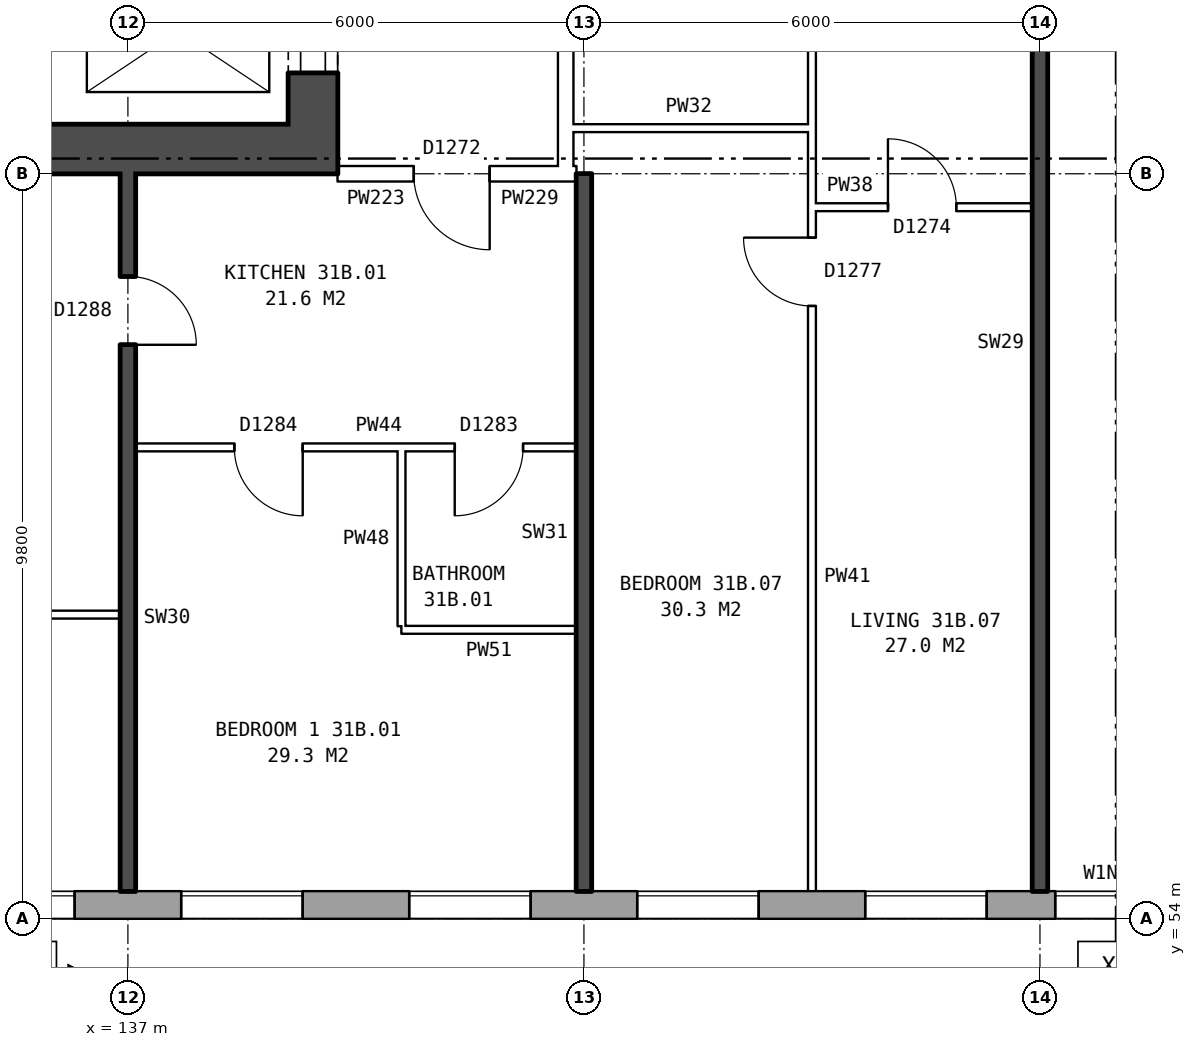
"""IFC4 building model, lengths in metres.
Left out: names, types, materials, properties, quantities, classifications, styles, units other than length and angle.
Written with IfcOpenShell. Run it as: python <this file> out.ifc"""

import sys

from ifc_helpers import new_model, si_unit, direction, frame, frame_2d, origin, place, context, subcontext, project, spatial, rectangle, extrude, element, fill, save


model = new_model("IFC4")
c1 = context("Model", 3, precision=1e-05, world=origin(), true_north=direction((0.0, 1.0)))
c2 = subcontext(c1, "Body", "Model", "MODEL_VIEW")
j1 = project(units=[si_unit("LENGTHUNIT", "METRE"), si_unit("PLANEANGLEUNIT", "RADIAN")], contexts=[c1])
p1 = place(None, origin())
s1 = spatial("IfcSite", under=j1, at=p1, CompositionType="ELEMENT")
p2 = place(p1, origin())
s2 = spatial("IfcBuilding", under=s1, at=p2, CompositionType="ELEMENT")
p3 = place(p2, frame((0.0, 0.0, 111.9)))
s3 = spatial("IfcBuildingStorey", under=s2, at=p3, CompositionType="ELEMENT", Elevation=111.9)
p4 = place(p3, frame((134.075, 54.18, 0.0), z_axis=(0.0, 0.0, 1.0), x_axis=(1.0, 0.0, 0.0)))
e1 = element("IfcWall", 1, at=p4, inside=s3, PredefinedType="STANDARD", context=c2, shape_type="SweptSolid", body=[
    extrude(rectangle(XDim=36.851, YDim=0.36, at=frame_2d((18.425, 0.0))), origin(), (0.0, 0.0, 1.0), 2.85),
])
p5 = place(p4, frame((0.625, 0.0, 0.8)))
e2 = element("IfcOpeningElement", 2, at=p5, cuts=e1, PredefinedType="OPENING", context=c2, shape_type="SweptSolid", body=[
    extrude(rectangle(XDim=1.6, YDim=1.8, at=frame_2d((0.8, 0.9))), frame((0.0, 0.19, 0.0), z_axis=(0.0, -1.0, 0.0), x_axis=(1.0, 0.0, 0.0)), (0.0, 0.0, 1.0), 0.38),
])
p6 = place(p4, frame((3.625, 0.0, 0.8)))
e3 = element("IfcOpeningElement", 3, at=p6, cuts=e1, PredefinedType="OPENING", context=c2, shape_type="SweptSolid", body=[
    extrude(rectangle(XDim=1.6, YDim=1.8, at=frame_2d((0.8, 0.9))), frame((0.0, 0.19, 0.0), z_axis=(0.0, -1.0, 0.0), x_axis=(1.0, 0.0, 0.0)), (0.0, 0.0, 1.0), 0.38),
])
p7 = place(p4, frame((6.625, 0.0, 0.8)))
e4 = element("IfcOpeningElement", 4, at=p7, cuts=e1, PredefinedType="OPENING", context=c2, shape_type="SweptSolid", body=[
    extrude(rectangle(XDim=1.6, YDim=1.8, at=frame_2d((0.8, 0.9))), frame((0.0, 0.19, 0.0), z_axis=(0.0, -1.0, 0.0), x_axis=(1.0, 0.0, 0.0)), (0.0, 0.0, 1.0), 0.38),
])
p8 = place(p4, frame((9.625, 0.0, 0.8)))
e5 = element("IfcOpeningElement", 5, at=p8, cuts=e1, PredefinedType="OPENING", context=c2, shape_type="SweptSolid", body=[
    extrude(rectangle(XDim=1.6, YDim=1.8, at=frame_2d((0.8, 0.9))), frame((0.0, 0.19, 0.0), z_axis=(0.0, -1.0, 0.0), x_axis=(1.0, 0.0, 0.0)), (0.0, 0.0, 1.0), 0.38),
])
p9 = place(p4, frame((12.625, 0.0, 0.8)))
e6 = element("IfcOpeningElement", 6, at=p9, cuts=e1, PredefinedType="OPENING", context=c2, shape_type="SweptSolid", body=[
    extrude(rectangle(XDim=1.6, YDim=1.8, at=frame_2d((0.8, 0.9))), frame((0.0, 0.19, 0.0), z_axis=(0.0, -1.0, 0.0), x_axis=(1.0, 0.0, 0.0)), (0.0, 0.0, 1.0), 0.38),
])
p10 = place(p4, frame((15.125, 0.0, 1.35)))
e7 = element("IfcOpeningElement", 7, at=p10, cuts=e1, PredefinedType="OPENING", context=c2, shape_type="SweptSolid", body=[
    extrude(rectangle(XDim=1.2, YDim=1.2, at=frame_2d((0.6, 0.6))), frame((0.0, 0.19, 0.0), z_axis=(0.0, -1.0, 0.0), x_axis=(1.0, 0.0, 0.0)), (0.0, 0.0, 1.0), 0.38),
])
p11 = place(p4, frame((18.075, 0.0, 0.25)))
e8 = element("IfcOpeningElement", 8, at=p11, cuts=e1, PredefinedType="OPENING", context=c2, shape_type="SweptSolid", body=[
    extrude(rectangle(XDim=0.8, YDim=1.5, at=frame_2d((0.4, 0.75))), frame((0.0, 0.19, 0.0), z_axis=(0.0, -1.0, 0.0), x_axis=(1.0, 0.0, 0.0)), (0.0, 0.0, 1.0), 0.38),
])
p12 = place(p4, frame((21.625, 0.0, 0.8)))
e9 = element("IfcOpeningElement", 9, at=p12, cuts=e1, PredefinedType="OPENING", context=c2, shape_type="SweptSolid", body=[
    extrude(rectangle(XDim=1.6, YDim=1.8, at=frame_2d((0.8, 0.9))), frame((0.0, 0.19, 0.0), z_axis=(0.0, -1.0, 0.0), x_axis=(1.0, 0.0, 0.0)), (0.0, 0.0, 1.0), 0.38),
])
p13 = place(p4, frame((24.625, 0.0, 0.8)))
e10 = element("IfcOpeningElement", 10, at=p13, cuts=e1, PredefinedType="OPENING", context=c2, shape_type="SweptSolid", body=[
    extrude(rectangle(XDim=1.6, YDim=1.8, at=frame_2d((0.8, 0.9))), frame((0.0, 0.19, 0.0), z_axis=(0.0, -1.0, 0.0), x_axis=(1.0, 0.0, 0.0)), (0.0, 0.0, 1.0), 0.38),
])
p14 = place(p4, frame((27.625, 0.0, 0.8)))
e11 = element("IfcOpeningElement", 11, at=p14, cuts=e1, PredefinedType="OPENING", context=c2, shape_type="SweptSolid", body=[
    extrude(rectangle(XDim=1.6, YDim=1.8, at=frame_2d((0.8, 0.9))), frame((0.0, 0.19, 0.0), z_axis=(0.0, -1.0, 0.0), x_axis=(1.0, 0.0, 0.0)), (0.0, 0.0, 1.0), 0.38),
])
p15 = place(p4, frame((30.625, 0.0, 0.8)))
e12 = element("IfcOpeningElement", 12, at=p15, cuts=e1, PredefinedType="OPENING", context=c2, shape_type="SweptSolid", body=[
    extrude(rectangle(XDim=1.6, YDim=1.8, at=frame_2d((0.8, 0.9))), frame((0.0, 0.19, 0.0), z_axis=(0.0, -1.0, 0.0), x_axis=(1.0, 0.0, 0.0)), (0.0, 0.0, 1.0), 0.38),
])
p16 = place(p4, frame((33.625, 0.0, 0.8)))
e13 = element("IfcOpeningElement", 13, at=p16, cuts=e1, PredefinedType="OPENING", context=c2, shape_type="SweptSolid", body=[
    extrude(rectangle(XDim=1.6, YDim=1.8, at=frame_2d((0.8, 0.9))), frame((0.0, 0.19, 0.0), z_axis=(0.0, -1.0, 0.0), x_axis=(1.0, 0.0, 0.0)), (0.0, 0.0, 1.0), 0.38),
])
p17 = place(p4, frame((17.075, 0.0, 0.15)))
e14 = element("IfcOpeningElement", 14, at=p17, cuts=e1, PredefinedType="OPENING", context=c2, shape_type="SweptSolid", body=[
    extrude(rectangle(XDim=0.6, YDim=0.9, at=frame_2d((0.3, 0.45))), frame((0.0, 0.19, 0.0), z_axis=(0.0, -1.0, 0.0), x_axis=(1.0, 0.0, 0.0)), (0.0, 0.0, 1.0), 0.38),
])
p18 = place(p4, frame((19.175, 0.0, 0.15)))
e15 = element("IfcOpeningElement", 15, at=p18, cuts=e1, PredefinedType="OPENING", context=c2, shape_type="SweptSolid", body=[
    extrude(rectangle(XDim=0.6, YDim=0.9, at=frame_2d((0.3, 0.45))), frame((0.0, 0.19, 0.0), z_axis=(0.0, -1.0, 0.0), x_axis=(1.0, 0.0, 0.0)), (0.0, 0.0, 1.0), 0.38),
])
p19 = place(p3, frame((139.435, 64.45, 0.0), z_axis=(0.0, 0.0, 1.0), x_axis=(0.0, 1.0, 0.0)))
e16 = element("IfcWall", 16, at=p19, inside=s3, PredefinedType="SHEAR", context=c2, shape_type="SweptSolid", body=[
    extrude(rectangle(XDim=11.1, YDim=0.65, at=frame_2d((5.55, 0.0))), origin(), (0.0, 0.0, 1.0), 2.85),
])
p20 = place(p19, frame((0.675, 0.0, 0.0)))
e17 = element("IfcOpeningElement", 17, at=p20, cuts=e16, PredefinedType="OPENING", context=c2, shape_type="SweptSolid", body=[
    extrude(rectangle(XDim=1.1, YDim=2.1, at=frame_2d((0.55, 1.05))), frame((0.0, 0.335, 0.0), z_axis=(0.0, -1.0, 0.0), x_axis=(1.0, 0.0, 0.0)), (0.0, 0.0, 1.0), 0.67),
])
p21 = place(p19, frame((9.25, 0.0, 0.0)))
e18 = element("IfcOpeningElement", 18, at=p21, cuts=e16, PredefinedType="OPENING", context=c2, shape_type="SweptSolid", body=[
    extrude(rectangle(XDim=1.1, YDim=2.1, at=frame_2d((0.55, 1.05))), frame((0.0, 0.335, 0.0), z_axis=(0.0, -1.0, 0.0), x_axis=(1.0, 0.0, 0.0)), (0.0, 0.0, 1.0), 0.67),
])
p22 = place(p19, frame((7.475, 0.0, 0.0)))
e19 = element("IfcOpeningElement", 19, at=p22, cuts=e16, PredefinedType="OPENING", context=c2, shape_type="SweptSolid", body=[
    extrude(rectangle(XDim=0.85, YDim=2.1, at=frame_2d((0.425, 1.05))), frame((0.0, 0.335, 0.0), z_axis=(0.0, -1.0, 0.0), x_axis=(1.0, 0.0, 0.0)), (0.0, 0.0, 1.0), 0.67),
])
p23 = place(p3, frame((139.76, 64.125, 0.0), z_axis=(0.0, 0.0, 1.0), x_axis=(-1.0, 0.0, 0.0)))
e20 = element("IfcWall", 20, at=p23, inside=s3, PredefinedType="SHEAR", context=c2, shape_type="SweptSolid", body=[
    extrude(rectangle(XDim=8.4, YDim=0.65, at=frame_2d((4.2, 0.0))), origin(), (0.0, 0.0, 1.0), 2.85),
])
p24 = place(p3, frame((142.76, 63.9, 0.0), z_axis=(0.0, 0.0, 1.0), x_axis=(0.0, 1.0, 0.0)))
e21 = element("IfcWall", 21, at=p24, inside=s3, PredefinedType="PARTITIONING", context=c2, shape_type="SweptSolid", body=[
    extrude(rectangle(XDim=12.2, YDim=0.2, at=frame_2d((6.1, 0.0))), origin(), (0.0, 0.0, 1.0), 2.85),
])
p25 = place(p24, frame((5.1, 0.0, 0.0)))
e22 = element("IfcOpeningElement", 22, at=p25, cuts=e21, PredefinedType="OPENING", context=c2, shape_type="SweptSolid", body=[
    extrude(rectangle(XDim=2.0, YDim=2.1, at=frame_2d((1.0, 1.05))), frame((0.0, 0.11, 0.0), z_axis=(0.0, -1.0, 0.0), x_axis=(1.0, 0.0, 0.0)), (0.0, 0.0, 1.0), 0.22),
])
p26 = place(p3, frame((140.6, 57.8, 0.0), z_axis=(0.0, 0.0, 1.0), x_axis=(1.0, 0.0, 0.0)))
e23 = element("IfcWall", 23, at=p26, inside=s3, PredefinedType="PARTITIONING", context=c2, shape_type="SweptSolid", body=[
    extrude(rectangle(XDim=2.3, YDim=0.1, at=frame_2d((1.15, 0.0))), origin(), (0.0, 0.0, 1.0), 2.85),
])
p27 = place(p3, frame((131.36, 58.0, 0.0), z_axis=(0.0, 0.0, 1.0), x_axis=(1.0, 0.0, 0.0)))
e24 = element("IfcWall", 24, at=p27, inside=s3, PredefinedType="PARTITIONING", context=c2, shape_type="SweptSolid", body=[
    extrude(rectangle(XDim=5.54, YDim=0.1, at=frame_2d((2.77, 0.0))), origin(), (0.0, 0.0, 1.0), 2.85),
])
p28 = place(p27, frame((2.32, 0.0, 0.0)))
e25 = element("IfcOpeningElement", 25, at=p28, cuts=e24, PredefinedType="OPENING", context=c2, shape_type="SweptSolid", body=[
    extrude(rectangle(XDim=0.9, YDim=2.1, at=frame_2d((0.45, 1.05))), frame((0.0, 0.06, 0.0), z_axis=(0.0, -1.0, 0.0), x_axis=(1.0, 0.0, 0.0)), (0.0, 0.0, 1.0), 0.12),
])
p29 = place(p3, frame((137.1, 60.2, 0.0), z_axis=(0.0, 0.0, 1.0), x_axis=(1.0, 0.0, 0.0)))
e26 = element("IfcWall", 26, at=p29, inside=s3, PredefinedType="PARTITIONING", context=c2, shape_type="SweptSolid", body=[
    extrude(rectangle(XDim=5.8, YDim=0.1, at=frame_2d((2.9, 0.0))), origin(), (0.0, 0.0, 1.0), 2.85),
])
p30 = place(p29, frame((1.3, 0.0, 0.0)))
e27 = element("IfcOpeningElement", 27, at=p30, cuts=e26, PredefinedType="OPENING", context=c2, shape_type="SweptSolid", body=[
    extrude(rectangle(XDim=0.9, YDim=2.1, at=frame_2d((0.45, 1.05))), frame((0.0, 0.06, 0.0), z_axis=(0.0, -1.0, 0.0), x_axis=(1.0, 0.0, 0.0)), (0.0, 0.0, 1.0), 0.12),
])
p31 = place(p29, frame((4.2, 0.0, 0.0)))
e28 = element("IfcOpeningElement", 28, at=p31, cuts=e26, PredefinedType="OPENING", context=c2, shape_type="SweptSolid", body=[
    extrude(rectangle(XDim=0.9, YDim=2.1, at=frame_2d((0.45, 1.05))), frame((0.0, 0.06, 0.0), z_axis=(0.0, -1.0, 0.0), x_axis=(1.0, 0.0, 0.0)), (0.0, 0.0, 1.0), 0.12),
])
p32 = place(p3, frame((146.0, 63.36, 0.0), z_axis=(0.0, 0.0, 1.0), x_axis=(1.0, 0.0, 0.0)))
e29 = element("IfcWall", 29, at=p32, inside=s3, PredefinedType="PARTITIONING", context=c2, shape_type="SweptSolid", body=[
    extrude(rectangle(XDim=2.9, YDim=0.1, at=frame_2d((1.45, 0.0))), origin(), (0.0, 0.0, 1.0), 2.85),
])
p33 = place(p32, frame((1.0, 0.0, 0.0)))
e30 = element("IfcOpeningElement", 30, at=p33, cuts=e29, PredefinedType="OPENING", context=c2, shape_type="SweptSolid", body=[
    extrude(rectangle(XDim=0.9, YDim=2.1, at=frame_2d((0.45, 1.05))), frame((0.0, 0.06, 0.0), z_axis=(0.0, -1.0, 0.0), x_axis=(1.0, 0.0, 0.0)), (0.0, 0.0, 1.0), 0.12),
])
p34 = place(p3, frame((139.76, 63.8, 0.0), z_axis=(0.0, 0.0, 1.0), x_axis=(1.0, 0.0, 0.0)))
e31 = element("IfcWall", 31, at=p34, inside=s3, PredefinedType="PARTITIONING", context=c2, shape_type="SweptSolid", body=[
    extrude(rectangle(XDim=3.0, YDim=0.2, at=frame_2d((1.5, 0.0))), origin(), (0.0, 0.0, 1.0), 2.85),
])
p35 = place(p34, frame((1.0, 0.0, 0.0)))
e32 = element("IfcOpeningElement", 32, at=p35, cuts=e31, PredefinedType="OPENING", context=c2, shape_type="SweptSolid", body=[
    extrude(rectangle(XDim=1.0, YDim=2.1, at=frame_2d((0.5, 1.05))), frame((0.0, 0.11, 0.0), z_axis=(0.0, -1.0, 0.0), x_axis=(1.0, 0.0, 0.0)), (0.0, 0.0, 1.0), 0.22),
])
p36 = place(p3, frame((142.76, 63.8, 0.0), z_axis=(0.0, 0.0, 1.0), x_axis=(1.0, 0.0, 0.0)))
e33 = element("IfcWall", 33, at=p36, inside=s3, PredefinedType="PARTITIONING", context=c2, shape_type="SweptSolid", body=[
    extrude(rectangle(XDim=0.14, YDim=0.2, at=frame_2d((0.07, 0.0))), origin(), (0.0, 0.0, 1.0), 2.85),
])
p37 = place(p3, frame((142.76, 64.4, 0.0), z_axis=(0.0, 0.0, 1.0), x_axis=(1.0, 0.0, 0.0)))
e34 = element("IfcWall", 34, at=p37, inside=s3, PredefinedType="PARTITIONING", context=c2, shape_type="SweptSolid", body=[
    extrude(rectangle(XDim=3.24, YDim=0.1, at=frame_2d((1.62, 0.0))), origin(), (0.0, 0.0, 1.0), 2.85),
])
p38 = place(p3, frame((137.0, 54.36, 0.0), z_axis=(0.0, 0.0, 1.0), x_axis=(0.0, 1.0, 0.0)))
e35 = element("IfcWall", 35, at=p38, inside=s3, PredefinedType="SOLIDWALL", context=c2, shape_type="SweptSolid", body=[
    extrude(rectangle(XDim=9.44, YDim=0.2, at=frame_2d((4.72, 0.0))), origin(), (0.0, 0.0, 1.0), 2.85),
])
p39 = place(p38, frame((7.19, 0.0, 0.0)))
e36 = element("IfcOpeningElement", 36, at=p39, cuts=e35, PredefinedType="OPENING", context=c2, shape_type="SweptSolid", body=[
    extrude(rectangle(XDim=0.9, YDim=2.1, at=frame_2d((0.45, 1.05))), frame((0.0, 0.11, 0.0), z_axis=(0.0, -1.0, 0.0), x_axis=(1.0, 0.0, 0.0)), (0.0, 0.0, 1.0), 0.22),
])
p40 = place(p3, frame((140.6, 57.85, 0.0), z_axis=(0.0, 0.0, 1.0), x_axis=(0.0, 1.0, 0.0)))
e37 = element("IfcWall", 37, at=p40, inside=s3, PredefinedType="PARTITIONING", context=c2, shape_type="SweptSolid", body=[
    extrude(rectangle(XDim=2.3, YDim=0.1, at=frame_2d((1.15, 0.0))), origin(), (0.0, 0.0, 1.0), 2.85),
])
p41 = place(p3, frame((143.0, 54.36, 0.0), z_axis=(0.0, 0.0, 1.0), x_axis=(0.0, 1.0, 0.0)))
e38 = element("IfcWall", 38, at=p41, inside=s3, PredefinedType="SOLIDWALL", context=c2, shape_type="SweptSolid", body=[
    extrude(rectangle(XDim=9.44, YDim=0.2, at=frame_2d((4.72, 0.0))), origin(), (0.0, 0.0, 1.0), 2.85),
])
p42 = place(p3, frame((146.0, 54.36, 0.0), z_axis=(0.0, 0.0, 1.0), x_axis=(0.0, 1.0, 0.0)))
e39 = element("IfcWall", 39, at=p42, inside=s3, PredefinedType="PARTITIONING", context=c2, shape_type="SweptSolid", body=[
    extrude(rectangle(XDim=14.34, YDim=0.1, at=frame_2d((7.17, 0.0))), origin(), (0.0, 0.0, 1.0), 2.85),
])
p43 = place(p42, frame((7.7, 0.0, 0.0)))
e40 = element("IfcOpeningElement", 40, at=p43, cuts=e39, PredefinedType="OPENING", context=c2, shape_type="SweptSolid", body=[
    extrude(rectangle(XDim=0.9, YDim=2.1, at=frame_2d((0.45, 1.05))), frame((0.0, 0.06, 0.0), z_axis=(0.0, -1.0, 0.0), x_axis=(1.0, 0.0, 0.0)), (0.0, 0.0, 1.0), 0.12),
])
p44 = place(p42, frame((13.04, 0.0, 0.0)))
e41 = element("IfcOpeningElement", 41, at=p44, cuts=e39, PredefinedType="OPENING", context=c2, shape_type="SweptSolid", body=[
    extrude(rectangle(XDim=0.9, YDim=2.1, at=frame_2d((0.45, 1.05))), frame((0.0, 0.06, 0.0), z_axis=(0.0, -1.0, 0.0), x_axis=(1.0, 0.0, 0.0)), (0.0, 0.0, 1.0), 0.12),
])
p45 = place(p3, frame((149.0, 54.36, 0.0), z_axis=(0.0, 0.0, 1.0), x_axis=(0.0, 1.0, 0.0)))
e42 = element("IfcWall", 42, at=p45, inside=s3, PredefinedType="SOLIDWALL", context=c2, shape_type="SweptSolid", body=[
    extrude(rectangle(XDim=14.44, YDim=0.2, at=frame_2d((7.22, 0.0))), origin(), (0.0, 0.0, 1.0), 2.85),
])
p46 = place(p5, origin())
e43 = element("IfcWindow", 43, at=p46, inside=s3, PartitioningType="SINGLE_PANEL", PredefinedType="WINDOW", context=c2, shape_type="SweptSolid", body=[
    extrude(rectangle(XDim=1.6, YDim=1.8, at=frame_2d((0.8, 0.9))), frame((0.0, 0.15, 0.0), z_axis=(0.0, -1.0, 0.0), x_axis=(1.0, 0.0, 0.0)), (0.0, 0.0, 1.0), 0.06),
])
fill(e2, e43)
p47 = place(p6, origin())
e44 = element("IfcWindow", 44, at=p47, inside=s3, PartitioningType="SINGLE_PANEL", PredefinedType="WINDOW", context=c2, shape_type="SweptSolid", body=[
    extrude(rectangle(XDim=1.6, YDim=1.8, at=frame_2d((0.8, 0.9))), frame((0.0, 0.15, 0.0), z_axis=(0.0, -1.0, 0.0), x_axis=(1.0, 0.0, 0.0)), (0.0, 0.0, 1.0), 0.06),
])
fill(e3, e44)
p48 = place(p7, origin())
e45 = element("IfcWindow", 45, at=p48, inside=s3, PartitioningType="SINGLE_PANEL", PredefinedType="WINDOW", context=c2, shape_type="SweptSolid", body=[
    extrude(rectangle(XDim=1.6, YDim=1.8, at=frame_2d((0.8, 0.9))), frame((0.0, 0.15, 0.0), z_axis=(0.0, -1.0, 0.0), x_axis=(1.0, 0.0, 0.0)), (0.0, 0.0, 1.0), 0.06),
])
fill(e4, e45)
p49 = place(p8, origin())
e46 = element("IfcWindow", 46, at=p49, inside=s3, PartitioningType="SINGLE_PANEL", PredefinedType="WINDOW", context=c2, shape_type="SweptSolid", body=[
    extrude(rectangle(XDim=1.6, YDim=1.8, at=frame_2d((0.8, 0.9))), frame((0.0, 0.15, 0.0), z_axis=(0.0, -1.0, 0.0), x_axis=(1.0, 0.0, 0.0)), (0.0, 0.0, 1.0), 0.06),
])
fill(e5, e46)
p50 = place(p9, origin())
e47 = element("IfcWindow", 47, at=p50, inside=s3, PartitioningType="SINGLE_PANEL", PredefinedType="WINDOW", context=c2, shape_type="SweptSolid", body=[
    extrude(rectangle(XDim=1.6, YDim=1.8, at=frame_2d((0.8, 0.9))), frame((0.0, 0.15, 0.0), z_axis=(0.0, -1.0, 0.0), x_axis=(1.0, 0.0, 0.0)), (0.0, 0.0, 1.0), 0.06),
])
fill(e6, e47)
p51 = place(p10, origin())
e48 = element("IfcWindow", 48, at=p51, inside=s3, PartitioningType="SINGLE_PANEL", PredefinedType="WINDOW", context=c2, shape_type="SweptSolid", body=[
    extrude(rectangle(XDim=1.2, YDim=1.2, at=frame_2d((0.6, 0.6))), frame((0.0, 0.15, 0.0), z_axis=(0.0, -1.0, 0.0), x_axis=(1.0, 0.0, 0.0)), (0.0, 0.0, 1.0), 0.06),
])
fill(e7, e48)
p52 = place(p20, origin())
e49 = element("IfcDoor", 49, at=p52, inside=s3, OperationType="DOUBLE_DOOR_SLIDING", PredefinedType="DOOR", context=c2, shape_type="SweptSolid", body=[
    extrude(rectangle(XDim=1.1, YDim=2.1, at=frame_2d((0.55, 1.05))), frame((0.0, 0.31, 0.0), z_axis=(0.0, -1.0, 0.0), x_axis=(1.0, 0.0, 0.0)), (0.0, 0.0, 1.0), 0.05),
])
fill(e17, e49)
p53 = place(p30, frame((0.9, 0.0, 0.0), z_axis=(0.0, 0.0, 1.0), x_axis=(-1.0, 0.0, 0.0)))
e50 = element("IfcDoor", 50, at=p53, inside=s3, OperationType="SINGLE_SWING_LEFT", PredefinedType="DOOR", context=c2, shape_type="SweptSolid", body=[
    extrude(rectangle(XDim=0.9, YDim=2.1, at=frame_2d((0.45, 1.05))), frame((0.0, 0.025, 0.0), z_axis=(0.0, -1.0, 0.0), x_axis=(1.0, 0.0, 0.0)), (0.0, 0.0, 1.0), 0.05),
])
fill(e27, e50)
p54 = place(p35, frame((1.0, 0.0, 0.0), z_axis=(0.0, 0.0, 1.0), x_axis=(-1.0, 0.0, 0.0)))
e51 = element("IfcDoor", 51, at=p54, inside=s3, OperationType="SINGLE_SWING_LEFT", PredefinedType="DOOR", context=c2, shape_type="SweptSolid", body=[
    extrude(rectangle(XDim=1.0, YDim=2.1, at=frame_2d((0.5, 1.05))), frame((0.0, 0.025, 0.0), z_axis=(0.0, -1.0, 0.0), x_axis=(1.0, 0.0, 0.0)), (0.0, 0.0, 1.0), 0.05),
])
fill(e32, e51)
p55 = place(p39, frame((0.9, 0.0, 0.0), z_axis=(0.0, 0.0, 1.0), x_axis=(-1.0, 0.0, 0.0)))
e52 = element("IfcDoor", 52, at=p55, inside=s3, OperationType="SINGLE_SWING_RIGHT", PredefinedType="DOOR", context=c2, shape_type="SweptSolid", body=[
    extrude(rectangle(XDim=0.9, YDim=2.1, at=frame_2d((0.45, 1.05))), frame((0.0, 0.025, 0.0), z_axis=(0.0, -1.0, 0.0), x_axis=(1.0, 0.0, 0.0)), (0.0, 0.0, 1.0), 0.05),
])
fill(e36, e52)
p56 = place(p31, frame((0.9, 0.0, 0.0), z_axis=(0.0, 0.0, 1.0), x_axis=(-1.0, 0.0, 0.0)))
e53 = element("IfcDoor", 53, at=p56, inside=s3, OperationType="SINGLE_SWING_RIGHT", PredefinedType="DOOR", context=c2, shape_type="SweptSolid", body=[
    extrude(rectangle(XDim=0.9, YDim=2.1, at=frame_2d((0.45, 1.05))), frame((0.0, 0.025, 0.0), z_axis=(0.0, -1.0, 0.0), x_axis=(1.0, 0.0, 0.0)), (0.0, 0.0, 1.0), 0.05),
])
fill(e28, e53)
p57 = place(p43, origin())
e54 = element("IfcDoor", 54, at=p57, inside=s3, OperationType="SINGLE_SWING_RIGHT", PredefinedType="DOOR", context=c2, shape_type="SweptSolid", body=[
    extrude(rectangle(XDim=0.9, YDim=2.1, at=frame_2d((0.45, 1.05))), frame((0.0, 0.025, 0.0), z_axis=(0.0, -1.0, 0.0), x_axis=(1.0, 0.0, 0.0)), (0.0, 0.0, 1.0), 0.05),
])
fill(e40, e54)
p58 = place(p33, origin())
e55 = element("IfcDoor", 55, at=p58, inside=s3, OperationType="SINGLE_SWING_LEFT", PredefinedType="DOOR", context=c2, shape_type="SweptSolid", body=[
    extrude(rectangle(XDim=0.9, YDim=2.1, at=frame_2d((0.45, 1.05))), frame((0.0, 0.025, 0.0), z_axis=(0.0, -1.0, 0.0), x_axis=(1.0, 0.0, 0.0)), (0.0, 0.0, 1.0), 0.05),
])
fill(e30, e55)
save(model, sys.argv[1])
